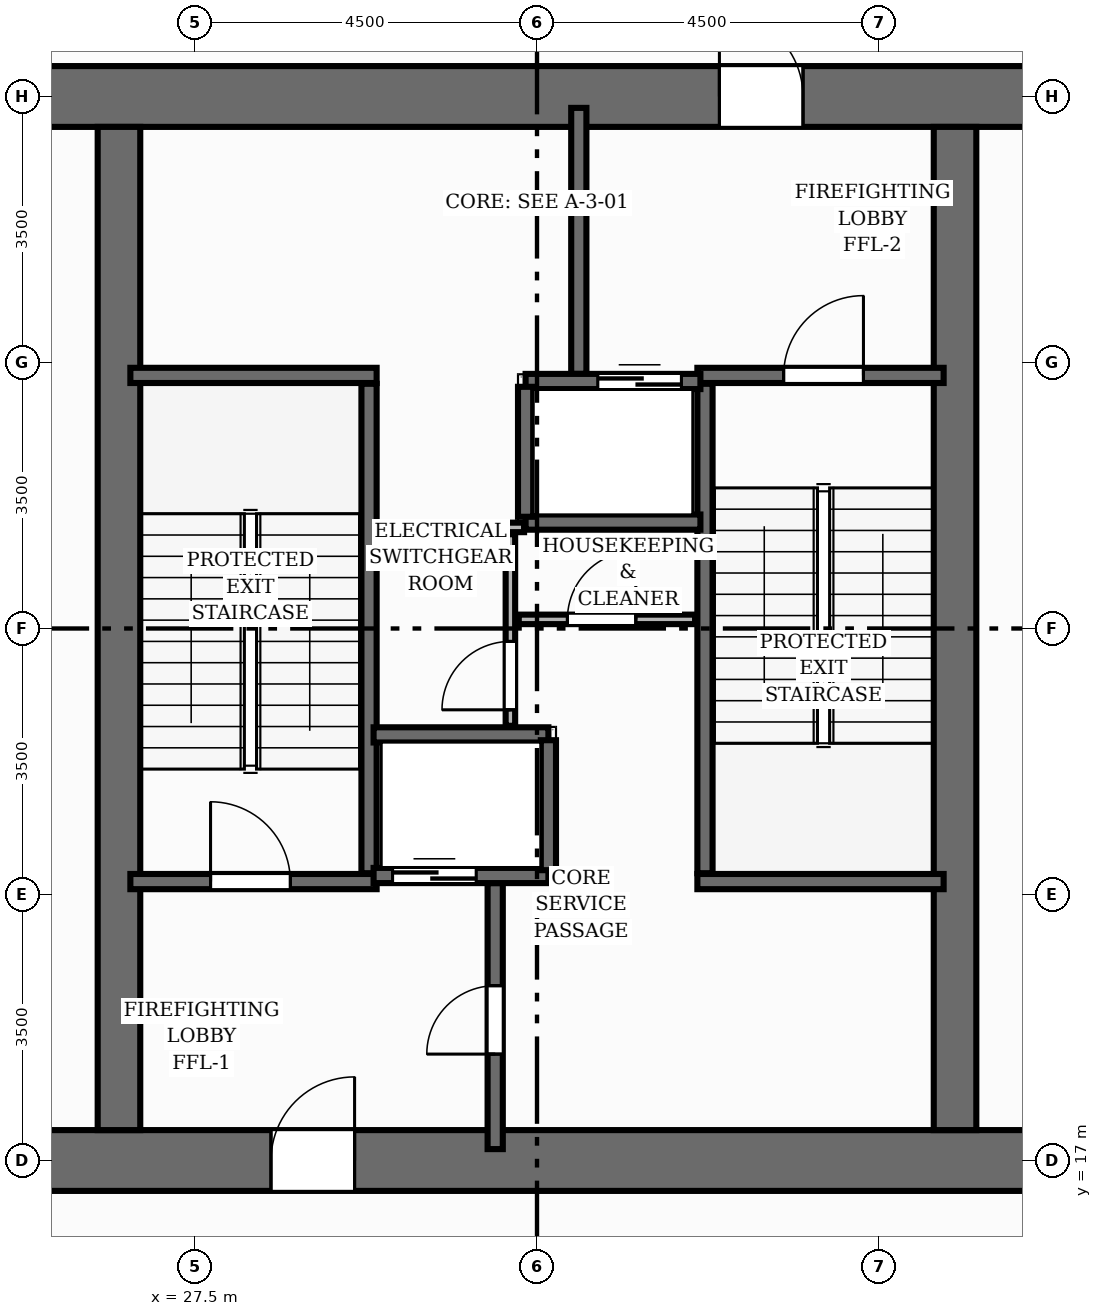
"""IFC4 building model, lengths in metres.
Left out: names, types, materials, properties, quantities, classifications, styles, units other than length and angle.
Written with IfcOpenShell. Run it as: python <this file> out.ifc"""

import sys

from ifc_helpers import new_model, si_unit, direction, frame, frame_2d, origin, place, context, subcontext, project, spatial, rectangle, extrude, element, fill, save


model = new_model("IFC4")
c1 = context("Model", 3, precision=1e-05, world=origin(), true_north=direction((0.0, 1.0)))
c2 = subcontext(c1, "Body", "Model", "MODEL_VIEW")
j1 = project(units=[si_unit("LENGTHUNIT", "METRE"), si_unit("PLANEANGLEUNIT", "RADIAN")], contexts=[c1])
p1 = place(None, origin())
s1 = spatial("IfcSite", under=j1, at=p1, CompositionType="ELEMENT")
p2 = place(p1, origin())
s2 = spatial("IfcBuilding", under=s1, at=p2, CompositionType="ELEMENT")
p3 = place(p2, frame((0.0, 0.0, -4.5)))
s3 = spatial("IfcBuildingStorey", under=s2, at=p3, CompositionType="ELEMENT", Elevation=-4.5)
p4 = place(p3, frame((22.6, 17.0, 0.0), z_axis=(0.0, 0.0, 1.0), x_axis=(1.0, 0.0, 0.0)))
e1 = element("IfcWall", 1, at=p4, inside=s3, PredefinedType="SHEAR", context=c2, shape_type="SweptSolid", body=[
    extrude(rectangle(XDim=18.8, YDim=0.8, at=frame_2d((9.4, 0.0))), origin(), (0.0, 0.0, 1.0), 4.5),
])
p5 = place(p4, frame((5.9, 0.0, 0.0)))
e2 = element("IfcOpeningElement", 2, at=p5, cuts=e1, PredefinedType="OPENING", context=c2, shape_type="SweptSolid", body=[
    extrude(rectangle(XDim=1.1, YDim=2.15, at=frame_2d((0.55, 1.075))), frame((0.0, 0.41, 0.0), z_axis=(0.0, -1.0, 0.0), x_axis=(1.0, 0.0, 0.0)), (0.0, 0.0, 1.0), 0.82),
])
p6 = place(p3, frame((22.6, 31.0, 0.0), z_axis=(0.0, 0.0, 1.0), x_axis=(1.0, 0.0, 0.0)))
e3 = element("IfcWall", 3, at=p6, inside=s3, PredefinedType="SHEAR", context=c2, shape_type="SweptSolid", body=[
    extrude(rectangle(XDim=18.8, YDim=0.8, at=frame_2d((9.4, 0.0))), origin(), (0.0, 0.0, 1.0), 4.5),
])
p7 = place(p6, frame((11.8, 0.0, 0.0)))
e4 = element("IfcOpeningElement", 4, at=p7, cuts=e3, PredefinedType="OPENING", context=c2, shape_type="SweptSolid", body=[
    extrude(rectangle(XDim=1.1, YDim=2.15, at=frame_2d((0.55, 1.075))), frame((0.0, 0.41, 0.0), z_axis=(0.0, -1.0, 0.0), x_axis=(1.0, 0.0, 0.0)), (0.0, 0.0, 1.0), 0.82),
])
for number, where, z_axis, x_axis in (
    (5, (26.5, 17.4, 0.0), (0.0, 0.0, 1.0), (0.0, 1.0, 0.0)),
    (6, (37.5, 17.4, 0.0), (0.0, 0.0, 1.0), (0.0, 1.0, 0.0)),
):
    element("IfcWall", number, at=place(p3, frame(where, z_axis=z_axis, x_axis=x_axis)), inside=s3, PredefinedType="SHEAR", context=c2, shape_type="SweptSolid", body=[
        extrude(rectangle(XDim=13.2, YDim=0.56, at=frame_2d((6.6, 0.0))), origin(), (0.0, 0.0, 1.0), 4.5),
    ])
p8 = place(p3, frame((29.79, 20.78, 0.0), z_axis=(0.0, 0.0, 1.0), x_axis=(0.0, 1.0, 0.0)))
e7 = element("IfcWall", 7, at=p8, inside=s3, PredefinedType="SHEAR", context=c2, shape_type="SweptSolid", body=[
    extrude(rectangle(XDim=6.44, YDim=0.2, at=frame_2d((3.22, 0.0))), origin(), (0.0, 0.0, 1.0), 4.5),
])
p9 = place(p3, frame((26.65, 27.33, 0.0), z_axis=(0.0, 0.0, 1.0), x_axis=(1.0, 0.0, 0.0)))
e8 = element("IfcWall", 8, at=p9, inside=s3, PredefinedType="SHEAR", context=c2, shape_type="SweptSolid", body=[
    extrude(rectangle(XDim=3.24, YDim=0.2, at=frame_2d((1.62, 0.0))), origin(), (0.0, 0.0, 1.0), 4.5),
])
p10 = place(p3, frame((26.65, 20.67, 0.0), z_axis=(0.0, 0.0, 1.0), x_axis=(1.0, 0.0, 0.0)))
e9 = element("IfcWall", 9, at=p10, inside=s3, PredefinedType="SHEAR", context=c2, shape_type="SweptSolid", body=[
    extrude(rectangle(XDim=3.24, YDim=0.2, at=frame_2d((1.62, 0.0))), origin(), (0.0, 0.0, 1.0), 4.5),
])
p11 = place(p10, frame((1.055, 0.0, 0.0)))
e10 = element("IfcOpeningElement", 10, at=p11, cuts=e9, PredefinedType="OPENING", context=c2, shape_type="SweptSolid", body=[
    extrude(rectangle(XDim=1.05, YDim=2.15, at=frame_2d((0.525, 1.075))), frame((0.0, 0.11, 0.0), z_axis=(0.0, -1.0, 0.0), x_axis=(1.0, 0.0, 0.0)), (0.0, 0.0, 1.0), 0.22),
])
p12 = place(p3, frame((34.21, 20.78, 0.0), z_axis=(0.0, 0.0, 1.0), x_axis=(0.0, 1.0, 0.0)))
e11 = element("IfcWall", 11, at=p12, inside=s3, PredefinedType="SHEAR", context=c2, shape_type="SweptSolid", body=[
    extrude(rectangle(XDim=6.44, YDim=0.2, at=frame_2d((3.22, 0.0))), origin(), (0.0, 0.0, 1.0), 4.5),
])
p13 = place(p3, frame((34.11, 20.67, 0.0), z_axis=(0.0, 0.0, 1.0), x_axis=(1.0, 0.0, 0.0)))
e12 = element("IfcWall", 12, at=p13, inside=s3, PredefinedType="SHEAR", context=c2, shape_type="SweptSolid", body=[
    extrude(rectangle(XDim=3.24, YDim=0.2, at=frame_2d((1.62, 0.0))), origin(), (0.0, 0.0, 1.0), 4.5),
])
p14 = place(p3, frame((34.11, 27.33, 0.0), z_axis=(0.0, 0.0, 1.0), x_axis=(1.0, 0.0, 0.0)))
e13 = element("IfcWall", 13, at=p14, inside=s3, PredefinedType="SHEAR", context=c2, shape_type="SweptSolid", body=[
    extrude(rectangle(XDim=3.24, YDim=0.2, at=frame_2d((1.62, 0.0))), origin(), (0.0, 0.0, 1.0), 4.5),
])
p15 = place(p14, frame((1.135, 0.0, 0.0)))
e14 = element("IfcOpeningElement", 14, at=p15, cuts=e13, PredefinedType="OPENING", context=c2, shape_type="SweptSolid", body=[
    extrude(rectangle(XDim=1.05, YDim=2.15, at=frame_2d((0.525, 1.075))), frame((0.0, 0.11, 0.0), z_axis=(0.0, -1.0, 0.0), x_axis=(1.0, 0.0, 0.0)), (0.0, 0.0, 1.0), 0.22),
])
p16 = place(p3, frame((31.45, 17.15, 0.0), z_axis=(0.0, 0.0, 1.0), x_axis=(0.0, 1.0, 0.0)))
e15 = element("IfcWall", 15, at=p16, inside=s3, PredefinedType="SHEAR", context=c2, shape_type="SweptSolid", body=[
    extrude(rectangle(XDim=3.5, YDim=0.2, at=frame_2d((1.75, 0.0))), origin(), (0.0, 0.0, 1.0), 4.5),
])
p17 = place(p16, frame((1.25, 0.0, 0.0)))
e16 = element("IfcOpeningElement", 16, at=p17, cuts=e15, PredefinedType="OPENING", context=c2, shape_type="SweptSolid", body=[
    extrude(rectangle(XDim=0.9, YDim=2.1, at=frame_2d((0.45, 1.05))), frame((0.0, 0.11, 0.0), z_axis=(0.0, -1.0, 0.0), x_axis=(1.0, 0.0, 0.0)), (0.0, 0.0, 1.0), 0.22),
])
p18 = place(p3, frame((32.55, 27.35, 0.0), z_axis=(0.0, 0.0, 1.0), x_axis=(0.0, 1.0, 0.0)))
e17 = element("IfcWall", 17, at=p18, inside=s3, PredefinedType="SHEAR", context=c2, shape_type="SweptSolid", body=[
    extrude(rectangle(XDim=3.5, YDim=0.2, at=frame_2d((1.75, 0.0))), origin(), (0.0, 0.0, 1.0), 4.5),
])
p19 = place(p3, frame((29.85, 20.75, 0.0), z_axis=(0.0, 0.0, 1.0), x_axis=(1.0, 0.0, 0.0)))
e18 = element("IfcWall", 18, at=p19, inside=s3, PredefinedType="SHEAR", context=c2, shape_type="SweptSolid", body=[
    extrude(rectangle(XDim=2.3, YDim=0.2, at=frame_2d((1.15, 0.0))), origin(), (0.0, 0.0, 1.0), 4.5),
])
p20 = place(p19, frame((0.25, 0.0, 0.0)))
e19 = element("IfcOpeningElement", 19, at=p20, cuts=e18, PredefinedType="OPENING", context=c2, shape_type="SweptSolid", body=[
    extrude(rectangle(XDim=1.1, YDim=2.15, at=frame_2d((0.55, 1.075))), frame((0.0, 0.11, 0.0), z_axis=(0.0, -1.0, 0.0), x_axis=(1.0, 0.0, 0.0)), (0.0, 0.0, 1.0), 0.22),
])
p21 = place(p3, frame((29.85, 22.6, 0.0), z_axis=(0.0, 0.0, 1.0), x_axis=(1.0, 0.0, 0.0)))
e20 = element("IfcWall", 20, at=p21, inside=s3, PredefinedType="SHEAR", context=c2, shape_type="SweptSolid", body=[
    extrude(rectangle(XDim=2.3, YDim=0.2, at=frame_2d((1.15, 0.0))), origin(), (0.0, 0.0, 1.0), 4.5),
])
p22 = place(p3, frame((32.15, 20.82, 0.0), z_axis=(0.0, 0.0, 1.0), x_axis=(0.0, 1.0, 0.0)))
e21 = element("IfcWall", 21, at=p22, inside=s3, PredefinedType="SHEAR", context=c2, shape_type="SweptSolid", body=[
    extrude(rectangle(XDim=1.71, YDim=0.2, at=frame_2d((0.855, 0.0))), origin(), (0.0, 0.0, 1.0), 4.5),
])
p23 = place(p3, frame((31.85, 27.25, 0.0), z_axis=(0.0, 0.0, 1.0), x_axis=(1.0, 0.0, 0.0)))
e22 = element("IfcWall", 22, at=p23, inside=s3, PredefinedType="SHEAR", context=c2, shape_type="SweptSolid", body=[
    extrude(rectangle(XDim=2.3, YDim=0.2, at=frame_2d((1.15, 0.0))), origin(), (0.0, 0.0, 1.0), 4.5),
])
p24 = place(p23, frame((0.95, 0.0, 0.0)))
e23 = element("IfcOpeningElement", 23, at=p24, cuts=e22, PredefinedType="OPENING", context=c2, shape_type="SweptSolid", body=[
    extrude(rectangle(XDim=1.1, YDim=2.15, at=frame_2d((0.55, 1.075))), frame((0.0, 0.11, 0.0), z_axis=(0.0, -1.0, 0.0), x_axis=(1.0, 0.0, 0.0)), (0.0, 0.0, 1.0), 0.22),
])
p25 = place(p3, frame((31.85, 25.4, 0.0), z_axis=(0.0, 0.0, 1.0), x_axis=(1.0, 0.0, 0.0)))
e24 = element("IfcWall", 24, at=p25, inside=s3, PredefinedType="SHEAR", context=c2, shape_type="SweptSolid", body=[
    extrude(rectangle(XDim=2.3, YDim=0.2, at=frame_2d((1.15, 0.0))), origin(), (0.0, 0.0, 1.0), 4.5),
])
p26 = place(p3, frame((31.85, 25.47, 0.0), z_axis=(0.0, 0.0, 1.0), x_axis=(0.0, 1.0, 0.0)))
e25 = element("IfcWall", 25, at=p26, inside=s3, PredefinedType="SHEAR", context=c2, shape_type="SweptSolid", body=[
    extrude(rectangle(XDim=1.71, YDim=0.2, at=frame_2d((0.855, 0.0))), origin(), (0.0, 0.0, 1.0), 4.5),
])
p27 = place(p3, frame((31.65, 22.72, 0.0), z_axis=(0.0, 0.0, 1.0), x_axis=(0.0, 1.0, 0.0)))
e26 = element("IfcWall", 26, at=p27, inside=s3, PredefinedType="PARTITIONING", context=c2, shape_type="SweptSolid", body=[
    extrude(rectangle(XDim=2.52, YDim=0.125, at=frame_2d((1.26, 0.0))), origin(), (0.0, 0.0, 1.0), 4.145),
])
p28 = place(p27, frame((0.21, 0.0, 0.0)))
e27 = element("IfcOpeningElement", 27, at=p28, cuts=e26, PredefinedType="OPENING", context=c2, shape_type="SweptSolid", body=[
    extrude(rectangle(XDim=0.9, YDim=2.1, at=frame_2d((0.45, 1.05))), frame((0.0, 0.073, 0.0), z_axis=(0.0, -1.0, 0.0), x_axis=(1.0, 0.0, 0.0)), (0.0, 0.0, 1.0), 0.145),
])
p29 = place(p3, frame((31.76, 24.12, 0.0), z_axis=(0.0, 0.0, 1.0), x_axis=(1.0, 0.0, 0.0)))
e28 = element("IfcWall", 28, at=p29, inside=s3, PredefinedType="PARTITIONING", context=c2, shape_type="SweptSolid", body=[
    extrude(rectangle(XDim=2.32, YDim=0.125, at=frame_2d((1.16, 0.0))), origin(), (0.0, 0.0, 1.0), 4.145),
])
p30 = place(p29, frame((0.64, 0.0, 0.0)))
e29 = element("IfcOpeningElement", 29, at=p30, cuts=e28, PredefinedType="OPENING", context=c2, shape_type="SweptSolid", body=[
    extrude(rectangle(XDim=0.9, YDim=2.1, at=frame_2d((0.45, 1.05))), frame((0.0, 0.073, 0.0), z_axis=(0.0, -1.0, 0.0), x_axis=(1.0, 0.0, 0.0)), (0.0, 0.0, 1.0), 0.145),
])
p31 = place(p3, frame((29.89, 25.33, 0.0), z_axis=(0.0, 0.0, 1.0), x_axis=(1.0, 0.0, 0.0)))
e30 = element("IfcWall", 30, at=p31, inside=s3, PredefinedType="PARTITIONING", context=c2, shape_type="SweptSolid", body=[
    extrude(rectangle(XDim=1.94, YDim=0.125, at=frame_2d((0.97, 0.0))), origin(), (0.0, 0.0, 1.0), 4.145),
])
p32 = place(p11, origin())
e31 = element("IfcDoor", 31, at=p32, inside=s3, OperationType="SINGLE_SWING_LEFT", PredefinedType="DOOR", context=c2, shape_type="SweptSolid", body=[
    extrude(rectangle(XDim=1.05, YDim=2.15, at=frame_2d((0.525, 1.075))), frame((0.0, 0.025, 0.0), z_axis=(0.0, -1.0, 0.0), x_axis=(1.0, 0.0, 0.0)), (0.0, 0.0, 1.0), 0.05),
])
fill(e10, e31)
p33 = place(p15, origin())
e32 = element("IfcDoor", 32, at=p33, inside=s3, OperationType="SINGLE_SWING_RIGHT", PredefinedType="DOOR", context=c2, shape_type="SweptSolid", body=[
    extrude(rectangle(XDim=1.05, YDim=2.15, at=frame_2d((0.525, 1.075))), frame((0.0, 0.025, 0.0), z_axis=(0.0, -1.0, 0.0), x_axis=(1.0, 0.0, 0.0)), (0.0, 0.0, 1.0), 0.05),
])
fill(e14, e32)
p34 = place(p5, origin())
e33 = element("IfcDoor", 33, at=p34, inside=s3, OperationType="SINGLE_SWING_RIGHT", PredefinedType="DOOR", context=c2, shape_type="SweptSolid", body=[
    extrude(rectangle(XDim=1.1, YDim=2.15, at=frame_2d((0.55, 1.075))), frame((0.0, 0.025, 0.0), z_axis=(0.0, -1.0, 0.0), x_axis=(1.0, 0.0, 0.0)), (0.0, 0.0, 1.0), 0.05),
])
fill(e2, e33)
p35 = place(p7, origin())
e34 = element("IfcDoor", 34, at=p35, inside=s3, OperationType="SINGLE_SWING_LEFT", PredefinedType="DOOR", context=c2, shape_type="SweptSolid", body=[
    extrude(rectangle(XDim=1.1, YDim=2.15, at=frame_2d((0.55, 1.075))), frame((0.0, 0.025, 0.0), z_axis=(0.0, -1.0, 0.0), x_axis=(1.0, 0.0, 0.0)), (0.0, 0.0, 1.0), 0.05),
])
fill(e4, e34)
p36 = place(p20, origin())
e35 = element("IfcDoor", 35, at=p36, inside=s3, OperationType="DOUBLE_DOOR_SLIDING", PredefinedType="DOOR", context=c2, shape_type="SweptSolid", body=[
    extrude(rectangle(XDim=1.1, YDim=2.15, at=frame_2d((0.55, 1.075))), frame((0.0, 0.025, 0.0), z_axis=(0.0, -1.0, 0.0), x_axis=(1.0, 0.0, 0.0)), (0.0, 0.0, 1.0), 0.05),
])
fill(e19, e35)
p37 = place(p24, origin())
e36 = element("IfcDoor", 36, at=p37, inside=s3, OperationType="DOUBLE_DOOR_SLIDING", PredefinedType="DOOR", context=c2, shape_type="SweptSolid", body=[
    extrude(rectangle(XDim=1.1, YDim=2.15, at=frame_2d((0.55, 1.075))), frame((0.0, 0.025, 0.0), z_axis=(0.0, -1.0, 0.0), x_axis=(1.0, 0.0, 0.0)), (0.0, 0.0, 1.0), 0.05),
])
fill(e23, e36)
p38 = place(p17, origin())
e37 = element("IfcDoor", 37, at=p38, inside=s3, OperationType="SINGLE_SWING_LEFT", PredefinedType="DOOR", context=c2, shape_type="SweptSolid", body=[
    extrude(rectangle(XDim=0.9, YDim=2.1, at=frame_2d((0.45, 1.05))), frame((0.0, 0.025, 0.0), z_axis=(0.0, -1.0, 0.0), x_axis=(1.0, 0.0, 0.0)), (0.0, 0.0, 1.0), 0.05),
])
fill(e16, e37)
p39 = place(p28, origin())
e38 = element("IfcDoor", 38, at=p39, inside=s3, OperationType="SINGLE_SWING_LEFT", PredefinedType="DOOR", context=c2, shape_type="SweptSolid", body=[
    extrude(rectangle(XDim=0.9, YDim=2.1, at=frame_2d((0.45, 1.05))), frame((0.0, 0.025, 0.0), z_axis=(0.0, -1.0, 0.0), x_axis=(1.0, 0.0, 0.0)), (0.0, 0.0, 1.0), 0.05),
])
fill(e27, e38)
p40 = place(p30, origin())
e39 = element("IfcDoor", 39, at=p40, inside=s3, OperationType="SINGLE_SWING_RIGHT", PredefinedType="DOOR", context=c2, shape_type="SweptSolid", body=[
    extrude(rectangle(XDim=0.9, YDim=2.1, at=frame_2d((0.45, 1.05))), frame((0.0, 0.025, 0.0), z_axis=(0.0, -1.0, 0.0), x_axis=(1.0, 0.0, 0.0)), (0.0, 0.0, 1.0), 0.05),
])
fill(e29, e39)
save(model, sys.argv[1])
